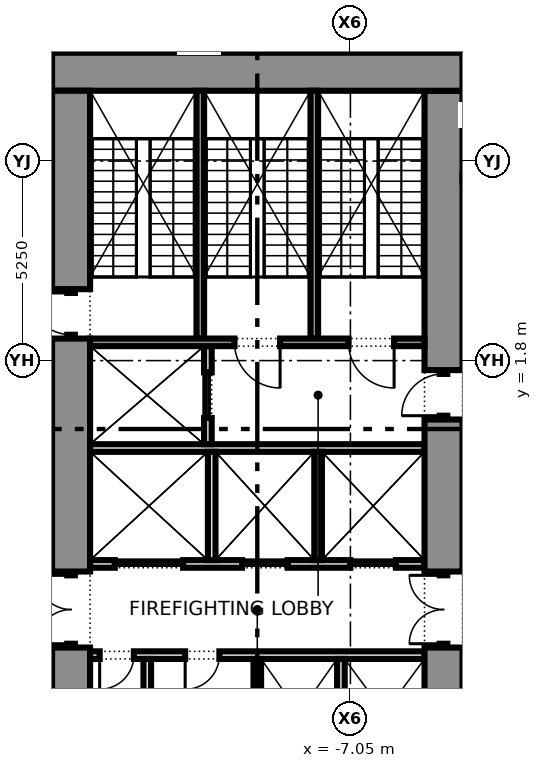
"""IFC4 building model, lengths in metres.
Left out: names, types, materials, properties, quantities, classifications, styles, units other than length and angle.
Written with IfcOpenShell. Run it as: python <this file> out.ifc"""

import sys

from ifc_helpers import new_model, si_unit, direction, frame, frame_2d, origin, place, context, subcontext, project, spatial, rectangle, extrude, element, fill, save


model = new_model("IFC4")
c1 = context("Model", 3, precision=1e-05, world=origin(), true_north=direction((0.0, 1.0)))
c2 = subcontext(c1, "Body", "Model", "MODEL_VIEW")
j1 = project(units=[si_unit("LENGTHUNIT", "METRE"), si_unit("PLANEANGLEUNIT", "RADIAN")], contexts=[c1])
p1 = place(None, origin())
s1 = spatial("IfcSite", under=j1, at=p1, CompositionType="ELEMENT")
p2 = place(p1, origin())
s2 = spatial("IfcBuilding", under=s1, at=p2, CompositionType="ELEMENT")
p3 = place(p2, frame((0.0, 0.0, 68.6)))
s3 = spatial("IfcBuildingStorey", under=s2, at=p3, CompositionType="ELEMENT", Elevation=68.6)
p4 = place(p3, frame((-14.9, 9.4, 0.0), z_axis=(0.0, 0.0, 1.0), x_axis=(1.0, 0.0, 0.0)))
e1 = element("IfcWall", 1, at=p4, inside=s3, PredefinedType="SHEAR", context=c2, shape_type="SweptSolid", body=[
    extrude(rectangle(XDim=10.8, YDim=1.0, at=frame_2d((5.4, 0.0))), origin(), (0.0, 0.0, 1.0), 4.4),
])
p5 = place(p3, frame((-14.4, -8.9, 0.0), z_axis=(0.0, 0.0, 1.0), x_axis=(0.0, 1.0, 0.0)))
e2 = element("IfcWall", 2, at=p5, inside=s3, PredefinedType="SHEAR", context=c2, shape_type="SweptSolid", body=[
    extrude(rectangle(XDim=3.15, YDim=1.0, at=frame_2d((1.575, 0.0))), origin(), (0.0, 0.0, 1.0), 4.4),
])
p6 = place(p3, frame((-14.4, -5.75, 0.0), z_axis=(0.0, 0.0, 1.0), x_axis=(0.0, 1.0, 0.0)))
e3 = element("IfcWall", 3, at=p6, inside=s3, PredefinedType="PARTITIONING", context=c2, shape_type="SweptSolid", body=[
    extrude(rectangle(XDim=2.0, YDim=0.2, at=frame_2d((1.0, 0.0))), origin(), (0.0, 0.0, 1.0), 2.4),
])
p7 = place(p6, frame((0.1, 0.0, 0.0)))
e4 = element("IfcOpeningElement", 4, at=p7, cuts=e3, PredefinedType="OPENING", context=c2, shape_type="SweptSolid", body=[
    extrude(rectangle(XDim=1.8, YDim=2.1, at=frame_2d((0.9, 1.05))), frame((0.0, 0.11, 0.0), z_axis=(0.0, -1.0, 0.0), x_axis=(1.0, 0.0, 0.0)), (0.0, 0.0, 1.0), 0.22),
])
p8 = place(p3, frame((-14.4, -3.75, 0.0), z_axis=(0.0, 0.0, 1.0), x_axis=(0.0, 1.0, 0.0)))
e5 = element("IfcWall", 5, at=p8, inside=s3, PredefinedType="SHEAR", context=c2, shape_type="SweptSolid", body=[
    extrude(rectangle(XDim=6.13, YDim=1.0, at=frame_2d((3.065, 0.0))), origin(), (0.0, 0.0, 1.0), 4.4),
])
p9 = place(p3, frame((-14.4, 2.38, 0.0), z_axis=(0.0, 0.0, 1.0), x_axis=(0.0, 1.0, 0.0)))
e6 = element("IfcWall", 6, at=p9, inside=s3, PredefinedType="SHEAR", context=c2, shape_type="SweptSolid", body=[
    extrude(rectangle(XDim=1.3, YDim=0.2, at=frame_2d((0.65, 0.0))), origin(), (0.0, 0.0, 1.0), 2.4),
])
p10 = place(p9, frame((0.1, 0.0, 0.0)))
e7 = element("IfcOpeningElement", 7, at=p10, cuts=e6, PredefinedType="OPENING", context=c2, shape_type="SweptSolid", body=[
    extrude(rectangle(XDim=1.1, YDim=2.1, at=frame_2d((0.55, 1.05))), frame((0.0, 0.11, 0.0), z_axis=(0.0, -1.0, 0.0), x_axis=(1.0, 0.0, 0.0)), (0.0, 0.0, 1.0), 0.22),
])
p11 = place(p3, frame((-14.4, 3.68, 0.0), z_axis=(0.0, 0.0, 1.0), x_axis=(0.0, 1.0, 0.0)))
e8 = element("IfcWall", 8, at=p11, inside=s3, PredefinedType="SHEAR", context=c2, shape_type="SweptSolid", body=[
    extrude(rectangle(XDim=5.22, YDim=1.0, at=frame_2d((2.61, 0.0))), origin(), (0.0, 0.0, 1.0), 4.4),
])
p12 = place(p3, frame((-4.6, -8.9, 0.0), z_axis=(0.0, 0.0, 1.0), x_axis=(0.0, 1.0, 0.0)))
e9 = element("IfcWall", 9, at=p12, inside=s3, PredefinedType="SHEAR", context=c2, shape_type="SweptSolid", body=[
    extrude(rectangle(XDim=3.15, YDim=1.0, at=frame_2d((1.575, 0.0))), origin(), (0.0, 0.0, 1.0), 4.4),
])
p13 = place(p3, frame((-4.6, -5.75, 0.0), z_axis=(0.0, 0.0, 1.0), x_axis=(0.0, 1.0, 0.0)))
e10 = element("IfcWall", 10, at=p13, inside=s3, PredefinedType="PARTITIONING", context=c2, shape_type="SweptSolid", body=[
    extrude(rectangle(XDim=2.0, YDim=0.2, at=frame_2d((1.0, 0.0))), origin(), (0.0, 0.0, 1.0), 2.4),
])
p14 = place(p13, frame((0.1, 0.0, 0.0)))
e11 = element("IfcOpeningElement", 11, at=p14, cuts=e10, PredefinedType="OPENING", context=c2, shape_type="SweptSolid", body=[
    extrude(rectangle(XDim=1.8, YDim=2.1, at=frame_2d((0.9, 1.05))), frame((0.0, 0.11, 0.0), z_axis=(0.0, -1.0, 0.0), x_axis=(1.0, 0.0, 0.0)), (0.0, 0.0, 1.0), 0.22),
])
p15 = place(p3, frame((-4.6, -3.75, 0.0), z_axis=(0.0, 0.0, 1.0), x_axis=(0.0, 1.0, 0.0)))
e12 = element("IfcWall", 12, at=p15, inside=s3, PredefinedType="SHEAR", context=c2, shape_type="SweptSolid", body=[
    extrude(rectangle(XDim=4.0, YDim=1.0, at=frame_2d((2.0, 0.0))), origin(), (0.0, 0.0, 1.0), 4.4),
])
p16 = place(p3, frame((-4.6, 0.25, 0.0), z_axis=(0.0, 0.0, 1.0), x_axis=(0.0, 1.0, 0.0)))
e13 = element("IfcWall", 13, at=p16, inside=s3, PredefinedType="PARTITIONING", context=c2, shape_type="SweptSolid", body=[
    extrude(rectangle(XDim=1.3, YDim=0.2, at=frame_2d((0.65, 0.0))), origin(), (0.0, 0.0, 1.0), 2.4),
])
p17 = place(p16, frame((0.1, 0.0, 0.0)))
e14 = element("IfcOpeningElement", 14, at=p17, cuts=e13, PredefinedType="OPENING", context=c2, shape_type="SweptSolid", body=[
    extrude(rectangle(XDim=1.1, YDim=2.1, at=frame_2d((0.55, 1.05))), frame((0.0, 0.11, 0.0), z_axis=(0.0, -1.0, 0.0), x_axis=(1.0, 0.0, 0.0)), (0.0, 0.0, 1.0), 0.22),
])
p18 = place(p3, frame((-4.6, 1.55, 0.0), z_axis=(0.0, 0.0, 1.0), x_axis=(0.0, 1.0, 0.0)))
e15 = element("IfcWall", 15, at=p18, inside=s3, PredefinedType="SHEAR", context=c2, shape_type="SweptSolid", body=[
    extrude(rectangle(XDim=7.35, YDim=1.0, at=frame_2d((3.675, 0.0))), origin(), (0.0, 0.0, 1.0), 4.4),
])
p19 = place(p3, frame((-13.9, -5.95, 0.0), z_axis=(0.0, 0.0, 1.0), x_axis=(1.0, 0.0, 0.0)))
e16 = element("IfcWall", 16, at=p19, inside=s3, PredefinedType="PARTITIONING", context=c2, shape_type="SweptSolid", body=[
    extrude(rectangle(XDim=8.8, YDim=0.2, at=frame_2d((4.4, 0.0))), origin(), (0.0, 0.0, 1.0), 4.4),
])
p20 = place(p19, frame((0.252, 0.0, 0.0)))
e17 = element("IfcOpeningElement", 17, at=p20, cuts=e16, PredefinedType="OPENING", context=c2, shape_type="SweptSolid", body=[
    extrude(rectangle(XDim=0.9, YDim=2.1, at=frame_2d((0.45, 1.05))), frame((0.0, 0.11, 0.0), z_axis=(0.0, -1.0, 0.0), x_axis=(1.0, 0.0, 0.0)), (0.0, 0.0, 1.0), 0.22),
])
p21 = place(p19, frame((2.502, 0.0, 0.0)))
e18 = element("IfcOpeningElement", 18, at=p21, cuts=e16, PredefinedType="OPENING", context=c2, shape_type="SweptSolid", body=[
    extrude(rectangle(XDim=0.9, YDim=2.1, at=frame_2d((0.45, 1.05))), frame((0.0, 0.11, 0.0), z_axis=(0.0, -1.0, 0.0), x_axis=(1.0, 0.0, 0.0)), (0.0, 0.0, 1.0), 0.22),
])
p22 = place(p3, frame((-13.9, -3.55, 0.0), z_axis=(0.0, 0.0, 1.0), x_axis=(1.0, 0.0, 0.0)))
e19 = element("IfcWall", 19, at=p22, inside=s3, PredefinedType="PARTITIONING", context=c2, shape_type="SweptSolid", body=[
    extrude(rectangle(XDim=8.8, YDim=0.2, at=frame_2d((4.4, 0.0))), origin(), (0.0, 0.0, 1.0), 4.4),
])
p23 = place(p22, frame((0.65, 0.0, 0.0)))
e20 = element("IfcOpeningElement", 20, at=p23, cuts=e19, PredefinedType="OPENING", context=c2, shape_type="SweptSolid", body=[
    extrude(rectangle(XDim=1.8, YDim=2.1, at=frame_2d((0.9, 1.05))), frame((0.0, 0.11, 0.0), z_axis=(0.0, -1.0, 0.0), x_axis=(1.0, 0.0, 0.0)), (0.0, 0.0, 1.0), 0.22),
])
p24 = place(p22, frame((4.0, 0.0, 0.0)))
e21 = element("IfcOpeningElement", 21, at=p24, cuts=e19, PredefinedType="OPENING", context=c2, shape_type="SweptSolid", body=[
    extrude(rectangle(XDim=1.2, YDim=2.1, at=frame_2d((0.6, 1.05))), frame((0.0, 0.11, 0.0), z_axis=(0.0, -1.0, 0.0), x_axis=(1.0, 0.0, 0.0)), (0.0, 0.0, 1.0), 0.22),
])
p25 = place(p22, frame((6.85, 0.0, 0.0)))
e22 = element("IfcOpeningElement", 22, at=p25, cuts=e19, PredefinedType="OPENING", context=c2, shape_type="SweptSolid", body=[
    extrude(rectangle(XDim=1.2, YDim=2.1, at=frame_2d((0.6, 1.05))), frame((0.0, 0.11, 0.0), z_axis=(0.0, -1.0, 0.0), x_axis=(1.0, 0.0, 0.0)), (0.0, 0.0, 1.0), 0.22),
])
p26 = place(p3, frame((-13.9, -0.5, 0.0), z_axis=(0.0, 0.0, 1.0), x_axis=(1.0, 0.0, 0.0)))
e23 = element("IfcWall", 23, at=p26, inside=s3, PredefinedType="PARTITIONING", context=c2, shape_type="SweptSolid", body=[
    extrude(rectangle(XDim=8.8, YDim=0.2, at=frame_2d((4.4, 0.0))), origin(), (0.0, 0.0, 1.0), 4.4),
])
p27 = place(p3, frame((-10.8, -0.4, 0.0), z_axis=(0.0, 0.0, 1.0), x_axis=(0.0, 1.0, 0.0)))
e24 = element("IfcWall", 24, at=p27, inside=s3, PredefinedType="PARTITIONING", context=c2, shape_type="SweptSolid", body=[
    extrude(rectangle(XDim=2.58, YDim=0.2, at=frame_2d((1.29, 0.0))), origin(), (0.0, 0.0, 1.0), 4.4),
])
p28 = place(p27, frame((0.69, 0.0, 0.0)))
e25 = element("IfcOpeningElement", 25, at=p28, cuts=e24, PredefinedType="OPENING", context=c2, shape_type="SweptSolid", body=[
    extrude(rectangle(XDim=1.2, YDim=2.1, at=frame_2d((0.6, 1.05))), frame((0.0, 0.11, 0.0), z_axis=(0.0, -1.0, 0.0), x_axis=(1.0, 0.0, 0.0)), (0.0, 0.0, 1.0), 0.22),
])
p29 = place(p3, frame((-13.9, 2.28, 0.0), z_axis=(0.0, 0.0, 1.0), x_axis=(1.0, 0.0, 0.0)))
e26 = element("IfcWall", 26, at=p29, inside=s3, PredefinedType="SHEAR", context=c2, shape_type="SweptSolid", body=[
    extrude(rectangle(XDim=8.8, YDim=0.2, at=frame_2d((4.4, 0.0))), origin(), (0.0, 0.0, 1.0), 4.4),
])
p30 = place(p29, frame((3.8, 0.0, 0.0)))
e27 = element("IfcOpeningElement", 27, at=p30, cuts=e26, PredefinedType="OPENING", context=c2, shape_type="SweptSolid", body=[
    extrude(rectangle(XDim=1.2, YDim=2.1, at=frame_2d((0.6, 1.05))), frame((0.0, 0.11, 0.0), z_axis=(0.0, -1.0, 0.0), x_axis=(1.0, 0.0, 0.0)), (0.0, 0.0, 1.0), 0.22),
])
p31 = place(p29, frame((6.8, 0.0, 0.0)))
e28 = element("IfcOpeningElement", 28, at=p31, cuts=e26, PredefinedType="OPENING", context=c2, shape_type="SweptSolid", body=[
    extrude(rectangle(XDim=1.2, YDim=2.1, at=frame_2d((0.6, 1.05))), frame((0.0, 0.11, 0.0), z_axis=(0.0, -1.0, 0.0), x_axis=(1.0, 0.0, 0.0)), (0.0, 0.0, 1.0), 0.22),
])
for number, where, z_axis, x_axis in (
    (29, (-11.0, 2.38, 0.0), (0.0, 0.0, 1.0), (0.0, 1.0, 0.0)),
    (30, (-8.0, 2.38, 0.0), (0.0, 0.0, 1.0), (0.0, 1.0, 0.0)),
):
    element("IfcWall", number, at=place(p3, frame(where, z_axis=z_axis, x_axis=x_axis)), inside=s3, PredefinedType="SHEAR", context=c2, shape_type="SweptSolid", body=[
        extrude(rectangle(XDim=6.52, YDim=0.2, at=frame_2d((3.26, 0.0))), origin(), (0.0, 0.0, 1.0), 4.4),
    ])
for number, where, z_axis, x_axis in (
    (31, (-9.5, -8.9, 0.0), (0.0, 0.0, 1.0), (0.0, 1.0, 0.0)),
    (32, (-7.3, -8.9, 0.0), (0.0, 0.0, 1.0), (0.0, 1.0, 0.0)),
    (33, (-12.395, -8.9, 0.0), (0.0, 0.0, 1.0), (0.0, 1.0, 0.0)),
    (34, (-10.7, -3.45, 0.0), (0.0, 0.0, 1.0), (0.0, 1.0, 0.0)),
    (35, (-7.9, -3.45, 0.0), (0.0, 0.0, 1.0), (0.0, 1.0, 0.0)),
):
    element("IfcWall", number, at=place(p3, frame(where, z_axis=z_axis, x_axis=x_axis)), inside=s3, PredefinedType="PARTITIONING", context=c2, shape_type="SweptSolid", body=[
        extrude(rectangle(XDim=2.85, YDim=0.2, at=frame_2d((1.425, 0.0))), origin(), (0.0, 0.0, 1.0), 4.4),
    ])
p32 = place(p7, origin())
e36 = element("IfcDoor", 36, at=p32, inside=s3, OperationType="DOUBLE_DOOR_SINGLE_SWING", PredefinedType="DOOR", context=c2, shape_type="SweptSolid", body=[
    extrude(rectangle(XDim=1.8, YDim=2.1, at=frame_2d((0.9, 1.05))), frame((0.0, 0.025, 0.0), z_axis=(0.0, -1.0, 0.0), x_axis=(1.0, 0.0, 0.0)), (0.0, 0.0, 1.0), 0.05),
])
fill(e4, e36)
p33 = place(p10, origin())
e37 = element("IfcDoor", 37, at=p33, inside=s3, OperationType="SINGLE_SWING_RIGHT", PredefinedType="DOOR", context=c2, shape_type="SweptSolid", body=[
    extrude(rectangle(XDim=1.1, YDim=2.1, at=frame_2d((0.55, 1.05))), frame((0.0, 0.025, 0.0), z_axis=(0.0, -1.0, 0.0), x_axis=(1.0, 0.0, 0.0)), (0.0, 0.0, 1.0), 0.05),
])
fill(e7, e37)
p34 = place(p14, origin())
e38 = element("IfcDoor", 38, at=p34, inside=s3, OperationType="DOUBLE_DOOR_SINGLE_SWING", PredefinedType="DOOR", context=c2, shape_type="SweptSolid", body=[
    extrude(rectangle(XDim=1.8, YDim=2.1, at=frame_2d((0.9, 1.05))), frame((0.0, 0.025, 0.0), z_axis=(0.0, -1.0, 0.0), x_axis=(1.0, 0.0, 0.0)), (0.0, 0.0, 1.0), 0.05),
])
fill(e11, e38)
p35 = place(p17, origin())
e39 = element("IfcDoor", 39, at=p35, inside=s3, OperationType="SINGLE_SWING_LEFT", PredefinedType="DOOR", context=c2, shape_type="SweptSolid", body=[
    extrude(rectangle(XDim=1.1, YDim=2.1, at=frame_2d((0.55, 1.05))), frame((0.0, 0.025, 0.0), z_axis=(0.0, -1.0, 0.0), x_axis=(1.0, 0.0, 0.0)), (0.0, 0.0, 1.0), 0.05),
])
fill(e14, e39)
p36 = place(p23, origin())
e40 = element("IfcDoor", 40, at=p36, inside=s3, OperationType="DOUBLE_DOOR_SLIDING", PredefinedType="DOOR", context=c2, shape_type="SweptSolid", body=[
    extrude(rectangle(XDim=1.8, YDim=2.1, at=frame_2d((0.9, 1.05))), frame((0.0, 0.025, 0.0), z_axis=(0.0, -1.0, 0.0), x_axis=(1.0, 0.0, 0.0)), (0.0, 0.0, 1.0), 0.05),
])
fill(e20, e40)
p37 = place(p24, origin())
e41 = element("IfcDoor", 41, at=p37, inside=s3, OperationType="DOUBLE_DOOR_SLIDING", PredefinedType="DOOR", context=c2, shape_type="SweptSolid", body=[
    extrude(rectangle(XDim=1.2, YDim=2.1, at=frame_2d((0.6, 1.05))), frame((0.0, 0.025, 0.0), z_axis=(0.0, -1.0, 0.0), x_axis=(1.0, 0.0, 0.0)), (0.0, 0.0, 1.0), 0.05),
])
fill(e21, e41)
p38 = place(p25, origin())
e42 = element("IfcDoor", 42, at=p38, inside=s3, OperationType="DOUBLE_DOOR_SLIDING", PredefinedType="DOOR", context=c2, shape_type="SweptSolid", body=[
    extrude(rectangle(XDim=1.2, YDim=2.1, at=frame_2d((0.6, 1.05))), frame((0.0, 0.025, 0.0), z_axis=(0.0, -1.0, 0.0), x_axis=(1.0, 0.0, 0.0)), (0.0, 0.0, 1.0), 0.05),
])
fill(e22, e42)
p39 = place(p28, origin())
e43 = element("IfcDoor", 43, at=p39, inside=s3, OperationType="DOUBLE_DOOR_SLIDING", PredefinedType="DOOR", context=c2, shape_type="SweptSolid", body=[
    extrude(rectangle(XDim=1.2, YDim=2.1, at=frame_2d((0.6, 1.05))), frame((0.0, 0.025, 0.0), z_axis=(0.0, -1.0, 0.0), x_axis=(1.0, 0.0, 0.0)), (0.0, 0.0, 1.0), 0.05),
])
fill(e25, e43)
p40 = place(p20, frame((0.9, 0.0, 0.0), z_axis=(0.0, 0.0, 1.0), x_axis=(-1.0, 0.0, 0.0)))
e44 = element("IfcDoor", 44, at=p40, inside=s3, OperationType="SINGLE_SWING_RIGHT", PredefinedType="DOOR", context=c2, shape_type="SweptSolid", body=[
    extrude(rectangle(XDim=0.9, YDim=2.1, at=frame_2d((0.45, 1.05))), frame((0.0, 0.025, 0.0), z_axis=(0.0, -1.0, 0.0), x_axis=(1.0, 0.0, 0.0)), (0.0, 0.0, 1.0), 0.05),
])
fill(e17, e44)
p41 = place(p21, frame((0.9, 0.0, 0.0), z_axis=(0.0, 0.0, 1.0), x_axis=(-1.0, 0.0, 0.0)))
e45 = element("IfcDoor", 45, at=p41, inside=s3, OperationType="SINGLE_SWING_RIGHT", PredefinedType="DOOR", context=c2, shape_type="SweptSolid", body=[
    extrude(rectangle(XDim=0.9, YDim=2.1, at=frame_2d((0.45, 1.05))), frame((0.0, 0.025, 0.0), z_axis=(0.0, -1.0, 0.0), x_axis=(1.0, 0.0, 0.0)), (0.0, 0.0, 1.0), 0.05),
])
fill(e18, e45)
p42 = place(p30, frame((1.2, 0.0, 0.0), z_axis=(0.0, 0.0, 1.0), x_axis=(-1.0, 0.0, 0.0)))
e46 = element("IfcDoor", 46, at=p42, inside=s3, OperationType="SINGLE_SWING_LEFT", PredefinedType="DOOR", context=c2, shape_type="SweptSolid", body=[
    extrude(rectangle(XDim=1.2, YDim=2.1, at=frame_2d((0.6, 1.05))), frame((0.0, 0.025, 0.0), z_axis=(0.0, -1.0, 0.0), x_axis=(1.0, 0.0, 0.0)), (0.0, 0.0, 1.0), 0.05),
])
fill(e27, e46)
p43 = place(p31, frame((1.2, 0.0, 0.0), z_axis=(0.0, 0.0, 1.0), x_axis=(-1.0, 0.0, 0.0)))
e47 = element("IfcDoor", 47, at=p43, inside=s3, OperationType="SINGLE_SWING_LEFT", PredefinedType="DOOR", context=c2, shape_type="SweptSolid", body=[
    extrude(rectangle(XDim=1.2, YDim=2.1, at=frame_2d((0.6, 1.05))), frame((0.0, 0.025, 0.0), z_axis=(0.0, -1.0, 0.0), x_axis=(1.0, 0.0, 0.0)), (0.0, 0.0, 1.0), 0.05),
])
fill(e28, e47)
save(model, sys.argv[1])
